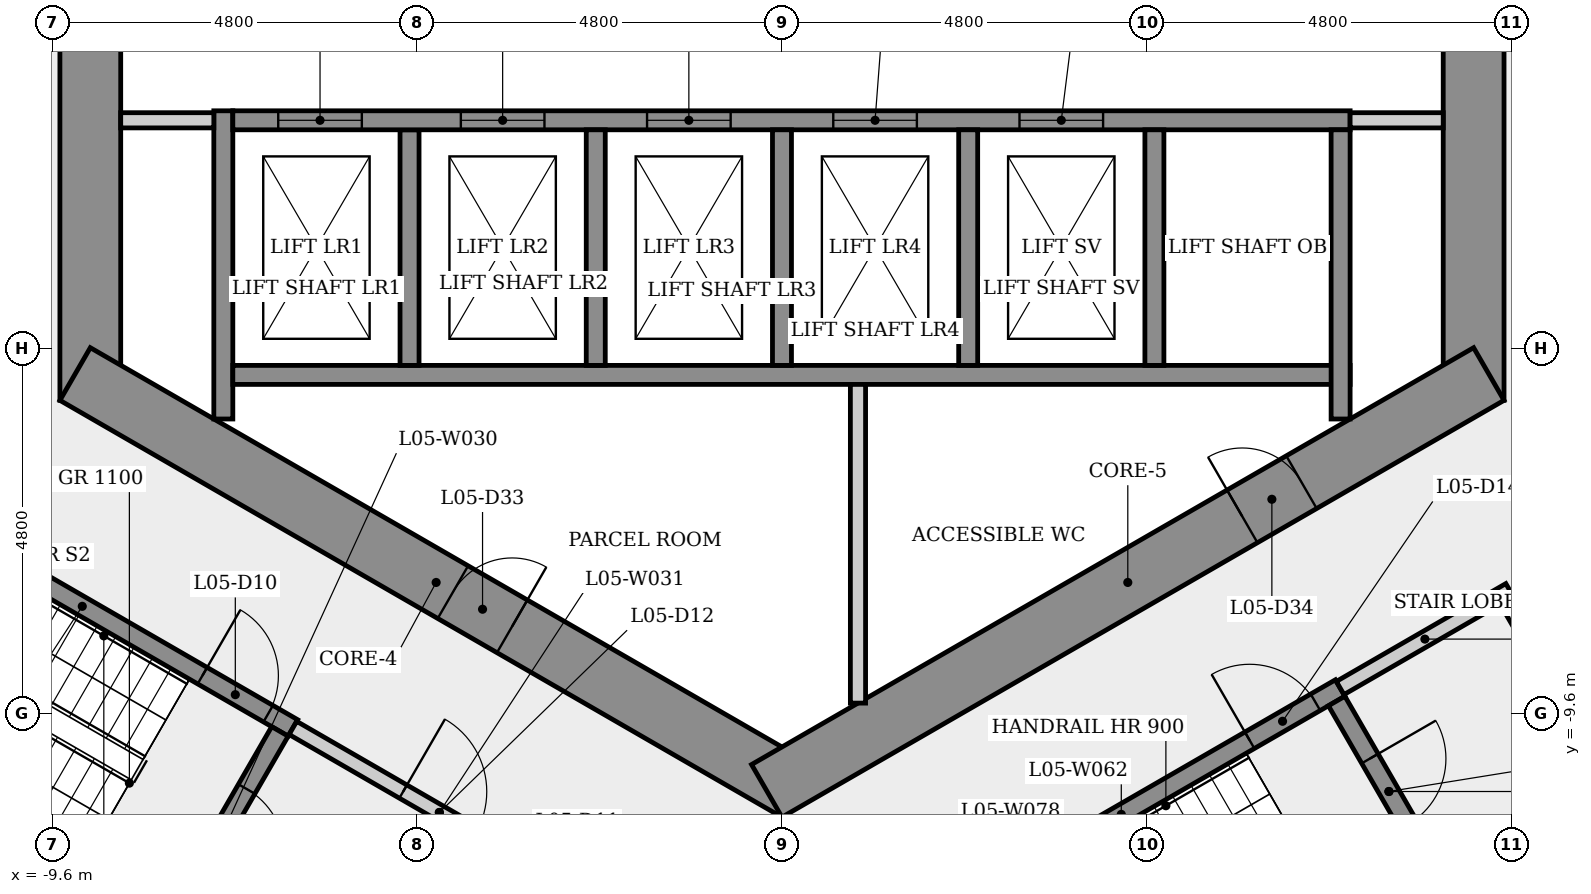
"""IFC4 building model, lengths in metres.
Left out: names, types, materials, properties, quantities, classifications, styles, units other than length and angle.
Written with IfcOpenShell. Run it as: python <this file> out.ifc"""

import sys

from ifc_helpers import new_model, si_unit, direction, frame, frame_2d, origin, place, context, subcontext, project, spatial, rectangle, extrude, element, fill, save


model = new_model("IFC4")
c1 = context("Model", 3, precision=1e-05, world=origin(), true_north=direction((0.0, 1.0)))
c2 = subcontext(c1, "Body", "Model", "MODEL_VIEW")
j1 = project(units=[si_unit("LENGTHUNIT", "METRE"), si_unit("PLANEANGLEUNIT", "RADIAN")], contexts=[c1])
p1 = place(None, origin())
s1 = spatial("IfcSite", under=j1, at=p1, CompositionType="ELEMENT")
p2 = place(p1, origin())
s2 = spatial("IfcBuilding", under=s1, at=p2, CompositionType="ELEMENT")
p3 = place(p2, frame((0.0, 0.0, 25.5)))
s3 = spatial("IfcBuildingStorey", under=s2, at=p3, CompositionType="ELEMENT", Elevation=25.5)
p4 = place(p3, frame((9.1, -5.485, 0.0), z_axis=(0.0, 0.0, 1.0), x_axis=(0.0, 1.0, 0.0)))
e1 = element("IfcWall", 1, at=p4, inside=s3, PredefinedType="SHEAR", context=c2, shape_type="SweptSolid", body=[
    extrude(rectangle(XDim=10.97, YDim=0.8, at=frame_2d((5.485, 0.0))), origin(), (0.0, 0.0, 1.0), 3.4),
])
p5 = place(p4, frame((4.685, 0.0, 0.0)))
e2 = element("IfcOpeningElement", 2, at=p5, cuts=e1, PredefinedType="OPENING", context=c2, shape_type="SweptSolid", body=[
    extrude(rectangle(XDim=1.6, YDim=2.1, at=frame_2d((0.8, 1.05))), frame((0.0, 0.41, 0.0), z_axis=(0.0, -1.0, 0.0), x_axis=(1.0, 0.0, 0.0)), (0.0, 0.0, 1.0), 0.82),
])
p6 = place(p3, frame((-9.1, 5.485, 0.0), z_axis=(0.0, 0.0, 1.0), x_axis=(0.0, -1.0, 0.0)))
e3 = element("IfcWall", 3, at=p6, inside=s3, PredefinedType="SHEAR", context=c2, shape_type="SweptSolid", body=[
    extrude(rectangle(XDim=10.97, YDim=0.8, at=frame_2d((5.485, 0.0))), origin(), (0.0, 0.0, 1.0), 3.4),
])
p7 = place(p6, frame((4.685, 0.0, 0.0)))
e4 = element("IfcOpeningElement", 4, at=p7, cuts=e3, PredefinedType="OPENING", context=c2, shape_type="SweptSolid", body=[
    extrude(rectangle(XDim=1.6, YDim=2.1, at=frame_2d((0.8, 1.05))), frame((0.0, 0.41, 0.0), z_axis=(0.0, -1.0, 0.0), x_axis=(1.0, 0.0, 0.0)), (0.0, 0.0, 1.0), 0.82),
])
p8 = place(p3, frame((-9.3, -5.138, 0.0), z_axis=(0.0, 0.0, 1.0), x_axis=(0.866023993627, -0.500002442456, 0.0)))
e5 = element("IfcWall", 5, at=p8, inside=s3, PredefinedType="SHEAR", context=c2, shape_type="SweptSolid", body=[
    extrude(rectangle(XDim=10.97, YDim=0.8, at=frame_2d((5.485, 0.0))), origin(), (0.0, 0.0, 1.0), 3.4),
])
p9 = place(p8, frame((5.74, 0.0, 0.0)))
e6 = element("IfcOpeningElement", 6, at=p9, cuts=e5, PredefinedType="OPENING", context=c2, shape_type="SweptSolid", body=[
    extrude(rectangle(XDim=0.9, YDim=2.1, at=frame_2d((0.45, 1.05))), frame((0.0, 0.41, 0.0), z_axis=(0.0, -1.0, 0.0), x_axis=(1.0, 0.0, 0.0)), (0.0, 0.0, 1.0), 0.82),
])
p10 = place(p3, frame((-0.2, -10.623, 0.0), z_axis=(0.0, 0.0, 1.0), x_axis=(0.866023993627, 0.500002442456, 0.0)))
e7 = element("IfcWall", 7, at=p10, inside=s3, PredefinedType="SHEAR", context=c2, shape_type="SweptSolid", body=[
    extrude(rectangle(XDim=10.97, YDim=0.8, at=frame_2d((5.485, 0.0))), origin(), (0.0, 0.0, 1.0), 3.4),
])
p11 = place(p10, frame((7.224, 0.0, 0.0)))
e8 = element("IfcOpeningElement", 8, at=p11, cuts=e7, PredefinedType="OPENING", context=c2, shape_type="SweptSolid", body=[
    extrude(rectangle(XDim=0.9, YDim=2.1, at=frame_2d((0.45, 1.05))), frame((0.0, 0.41, 0.0), z_axis=(0.0, -1.0, 0.0), x_axis=(1.0, 0.0, 0.0)), (0.0, 0.0, 1.0), 0.82),
])
p12 = place(p3, frame((-11.977, -6.595, 0.0), z_axis=(0.0, 0.0, 1.0), x_axis=(0.866025499775, -0.499999833739, 0.0)))
e9 = element("IfcWall", 9, at=p12, inside=s3, PredefinedType="SHEAR", context=c2, shape_type="SweptSolid", body=[
    extrude(rectangle(XDim=6.4, YDim=0.25, at=frame_2d((3.2, 0.0))), origin(), (0.0, 0.0, 1.0), 3.05),
])
p13 = place(p12, frame((5.025, 0.0, 0.0)))
e10 = element("IfcOpeningElement", 10, at=p13, cuts=e9, PredefinedType="OPENING", context=c2, shape_type="SweptSolid", body=[
    extrude(rectangle(XDim=1.0, YDim=2.1, at=frame_2d((0.5, 1.05))), frame((0.0, 0.135, 0.0), z_axis=(0.0, -1.0, 0.0), x_axis=(1.0, 0.0, 0.0)), (0.0, 0.0, 1.0), 0.27),
])
p14 = place(p3, frame((-7.935, -12.393, 0.0), z_axis=(0.0, 0.0, 1.0), x_axis=(-0.866025499775, 0.499999833739, 0.0)))
e11 = element("IfcWall", 11, at=p14, inside=s3, PredefinedType="SHEAR", context=c2, shape_type="SweptSolid", body=[
    extrude(rectangle(XDim=6.4, YDim=0.25, at=frame_2d((3.2, 0.0))), origin(), (0.0, 0.0, 1.0), 3.05),
])
p15 = place(p3, frame((-7.35, -5.73, 0.0), z_axis=(0.0, 0.0, 1.0), x_axis=(0.0, 1.0, 0.0)))
e12 = element("IfcWall", 12, at=p15, inside=s3, PredefinedType="SHEAR", context=c2, shape_type="SweptSolid", body=[
    extrude(rectangle(XDim=4.055, YDim=0.25, at=frame_2d((2.028, 0.0))), origin(), (0.0, 0.0, 1.0), 3.05),
])
p16 = place(p3, frame((-7.475, -1.8, 0.0), z_axis=(0.0, 0.0, 1.0), x_axis=(-1.0, 0.0, 0.0)))
e13 = element("IfcWall", 13, at=p16, inside=s3, PredefinedType="PARTITIONING", context=c2, shape_type="SweptSolid", body=[
    extrude(rectangle(XDim=1.225, YDim=0.2, at=frame_2d((0.613, 0.0))), origin(), (0.0, 0.0, 1.0), 3.05),
])
p17 = place(p3, frame((-6.605, -9.841, 0.0), z_axis=(0.0, 0.0, 1.0), x_axis=(-0.499996545922, -0.866027397988, 0.0)))
e14 = element("IfcWall", 14, at=p17, inside=s3, PredefinedType="SHEAR", context=c2, shape_type="SweptSolid", body=[
    extrude(rectangle(XDim=2.75, YDim=0.25, at=frame_2d((1.375, 0.0))), origin(), (0.0, 0.0, 1.0), 3.05),
])
p18 = place(p17, frame((0.875, 0.0, 0.0)))
e15 = element("IfcOpeningElement", 15, at=p18, cuts=e14, PredefinedType="OPENING", context=c2, shape_type="SweptSolid", body=[
    extrude(rectangle(XDim=1.0, YDim=2.1, at=frame_2d((0.5, 1.05))), frame((0.0, 0.135, 0.0), z_axis=(0.0, -1.0, 0.0), x_axis=(1.0, 0.0, 0.0)), (0.0, 0.0, 1.0), 0.27),
])
p19 = place(p3, frame((-6.435, -9.795, 0.0), z_axis=(0.0, 0.0, 1.0), x_axis=(0.866012907634, -0.500021643343, 0.0)))
e16 = element("IfcWall", 16, at=p19, inside=s3, PredefinedType="PARTITIONING", context=c2, shape_type="SweptSolid", body=[
    extrude(rectangle(XDim=4.45, YDim=0.2, at=frame_2d((2.225, 0.0))), origin(), (0.0, 0.0, 1.0), 3.05),
])
p20 = place(p19, frame((1.675, 0.0, 0.0)))
e17 = element("IfcOpeningElement", 17, at=p20, cuts=e16, PredefinedType="OPENING", context=c2, shape_type="SweptSolid", body=[
    extrude(rectangle(XDim=1.1, YDim=2.1, at=frame_2d((0.55, 1.05))), frame((0.0, 0.11, 0.0), z_axis=(0.0, -1.0, 0.0), x_axis=(1.0, 0.0, 0.0)), (0.0, 0.0, 1.0), 0.22),
])
p21 = place(p3, frame((-7.225, -5.15, 0.0), z_axis=(0.0, 0.0, 1.0), x_axis=(1.0, 0.0, 0.0)))
e18 = element("IfcWall", 18, at=p21, inside=s3, PredefinedType="SHEAR", context=c2, shape_type="SweptSolid", body=[
    extrude(rectangle(XDim=14.7, YDim=0.25, at=frame_2d((7.35, 0.0))), origin(), (0.0, 0.0, 1.0), 3.05),
])
p22 = place(p3, frame((-4.9, -1.925, 0.0), z_axis=(0.0, 0.0, 1.0), x_axis=(0.0, -1.0, 0.0)))
e19 = element("IfcWall", 19, at=p22, inside=s3, PredefinedType="SHEAR", context=c2, shape_type="SweptSolid", body=[
    extrude(rectangle(XDim=3.1, YDim=0.25, at=frame_2d((1.55, 0.0))), origin(), (0.0, 0.0, 1.0), 3.4),
])
p23 = place(p3, frame((-7.225, -1.8, 0.0), z_axis=(0.0, 0.0, 1.0), x_axis=(1.0, 0.0, 0.0)))
e20 = element("IfcWall", 20, at=p23, inside=s3, PredefinedType="SHEAR", context=c2, shape_type="SweptSolid", body=[
    extrude(rectangle(XDim=14.7, YDim=0.25, at=frame_2d((7.35, 0.0))), origin(), (0.0, 0.0, 1.0), 3.05),
])
p24 = place(p23, frame((0.597, 0.0, 0.0)))
e21 = element("IfcOpeningElement", 21, at=p24, cuts=e20, PredefinedType="OPENING", context=c2, shape_type="SweptSolid", body=[
    extrude(rectangle(XDim=1.1, YDim=2.1, at=frame_2d((0.55, 1.05))), frame((0.0, 0.135, 0.0), z_axis=(0.0, -1.0, 0.0), x_axis=(1.0, 0.0, 0.0)), (0.0, 0.0, 1.0), 0.27),
])
p25 = place(p23, frame((3.0, 0.0, 0.0)))
e22 = element("IfcOpeningElement", 22, at=p25, cuts=e20, PredefinedType="OPENING", context=c2, shape_type="SweptSolid", body=[
    extrude(rectangle(XDim=1.1, YDim=2.1, at=frame_2d((0.55, 1.05))), frame((0.0, 0.135, 0.0), z_axis=(0.0, -1.0, 0.0), x_axis=(1.0, 0.0, 0.0)), (0.0, 0.0, 1.0), 0.27),
])
p26 = place(p23, frame((5.45, 0.0, 0.0)))
e23 = element("IfcOpeningElement", 23, at=p26, cuts=e20, PredefinedType="OPENING", context=c2, shape_type="SweptSolid", body=[
    extrude(rectangle(XDim=1.1, YDim=2.1, at=frame_2d((0.55, 1.05))), frame((0.0, 0.135, 0.0), z_axis=(0.0, -1.0, 0.0), x_axis=(1.0, 0.0, 0.0)), (0.0, 0.0, 1.0), 0.27),
])
p27 = place(p23, frame((7.9, 0.0, 0.0)))
e24 = element("IfcOpeningElement", 24, at=p27, cuts=e20, PredefinedType="OPENING", context=c2, shape_type="SweptSolid", body=[
    extrude(rectangle(XDim=1.1, YDim=2.1, at=frame_2d((0.55, 1.05))), frame((0.0, 0.135, 0.0), z_axis=(0.0, -1.0, 0.0), x_axis=(1.0, 0.0, 0.0)), (0.0, 0.0, 1.0), 0.27),
])
p28 = place(p23, frame((10.35, 0.0, 0.0)))
e25 = element("IfcOpeningElement", 25, at=p28, cuts=e20, PredefinedType="OPENING", context=c2, shape_type="SweptSolid", body=[
    extrude(rectangle(XDim=1.1, YDim=2.1, at=frame_2d((0.55, 1.05))), frame((0.0, 0.135, 0.0), z_axis=(0.0, -1.0, 0.0), x_axis=(1.0, 0.0, 0.0)), (0.0, 0.0, 1.0), 0.27),
])
for number, where, z_axis, x_axis in (
    (26, (-2.45, -1.925, 0.0), (0.0, 0.0, 1.0), (0.0, -1.0, 0.0)),
    (27, (0.0, -1.925, 0.0), (0.0, 0.0, 1.0), (0.0, -1.0, 0.0)),
):
    element("IfcWall", number, at=place(p3, frame(where, z_axis=z_axis, x_axis=x_axis)), inside=s3, PredefinedType="SHEAR", context=c2, shape_type="SweptSolid", body=[
        extrude(rectangle(XDim=3.1, YDim=0.25, at=frame_2d((1.55, 0.0))), origin(), (0.0, 0.0, 1.0), 3.4),
    ])
p29 = place(p3, frame((1.0, -5.275, 0.0), z_axis=(0.0, 0.0, 1.0), x_axis=(0.0, -1.0, 0.0)))
e28 = element("IfcWall", 28, at=p29, inside=s3, PredefinedType="PARTITIONING", context=c2, shape_type="SweptSolid", body=[
    extrude(rectangle(XDim=4.194, YDim=0.2, at=frame_2d((2.097, 0.0))), origin(), (0.0, 0.0, 1.0), 3.05),
])
p30 = place(p3, frame((1.585, -12.595, 0.0), z_axis=(0.0, 0.0, 1.0), x_axis=(0.866036417653, 0.499980922934, 0.0)))
e29 = element("IfcWall", 29, at=p30, inside=s3, PredefinedType="SHEAR", context=c2, shape_type="SweptSolid", body=[
    extrude(rectangle(XDim=6.65, YDim=0.25, at=frame_2d((3.325, 0.0))), origin(), (0.0, 0.0, 1.0), 3.05),
])
p31 = place(p30, frame((5.275, 0.0, 0.0)))
e30 = element("IfcOpeningElement", 30, at=p31, cuts=e29, PredefinedType="OPENING", context=c2, shape_type="SweptSolid", body=[
    extrude(rectangle(XDim=1.0, YDim=2.1, at=frame_2d((0.5, 1.05))), frame((0.0, 0.135, 0.0), z_axis=(0.0, -1.0, 0.0), x_axis=(1.0, 0.0, 0.0)), (0.0, 0.0, 1.0), 0.27),
])
for number, where, z_axis, x_axis in (
    (31, (2.45, -1.925, 0.0), (0.0, 0.0, 1.0), (0.0, -1.0, 0.0)),
    (32, (4.9, -1.925, 0.0), (0.0, 0.0, 1.0), (0.0, -1.0, 0.0)),
):
    element("IfcWall", number, at=place(p3, frame(where, z_axis=z_axis, x_axis=x_axis)), inside=s3, PredefinedType="SHEAR", context=c2, shape_type="SweptSolid", body=[
        extrude(rectangle(XDim=3.1, YDim=0.25, at=frame_2d((1.55, 0.0))), origin(), (0.0, 0.0, 1.0), 3.4),
    ])
p32 = place(p3, frame((7.298, -9.441, 0.0), z_axis=(0.0, 0.0, 1.0), x_axis=(0.500034990121, -0.866005201286, 0.0)))
e33 = element("IfcWall", 33, at=p32, inside=s3, PredefinedType="SHEAR", context=c2, shape_type="SweptSolid", body=[
    extrude(rectangle(XDim=2.75, YDim=0.25, at=frame_2d((1.375, 0.0))), origin(), (0.0, 0.0, 1.0), 3.05),
])
p33 = place(p32, frame((0.875, 0.0, 0.0)))
e34 = element("IfcOpeningElement", 34, at=p33, cuts=e33, PredefinedType="OPENING", context=c2, shape_type="SweptSolid", body=[
    extrude(rectangle(XDim=1.0, YDim=2.1, at=frame_2d((0.5, 1.05))), frame((0.0, 0.135, 0.0), z_axis=(0.0, -1.0, 0.0), x_axis=(1.0, 0.0, 0.0)), (0.0, 0.0, 1.0), 0.27),
])
p34 = place(p3, frame((7.344, -9.27, 0.0), z_axis=(0.0, 0.0, 1.0), x_axis=(0.866005588531, 0.500034319456, 0.0)))
e35 = element("IfcWall", 35, at=p34, inside=s3, PredefinedType="PARTITIONING", context=c2, shape_type="SweptSolid", body=[
    extrude(rectangle(XDim=2.575, YDim=0.2, at=frame_2d((1.288, 0.0))), origin(), (0.0, 0.0, 1.0), 3.05),
])
p35 = place(p3, frame((7.35, -1.925, 0.0), z_axis=(0.0, 0.0, 1.0), x_axis=(0.0, -1.0, 0.0)))
e36 = element("IfcWall", 36, at=p35, inside=s3, PredefinedType="SHEAR", context=c2, shape_type="SweptSolid", body=[
    extrude(rectangle(XDim=3.805, YDim=0.25, at=frame_2d((1.903, 0.0))), origin(), (0.0, 0.0, 1.0), 3.05),
])
p36 = place(p3, frame((8.7, -1.8, 0.0), z_axis=(0.0, 0.0, 1.0), x_axis=(-1.0, 0.0, 0.0)))
e37 = element("IfcWall", 37, at=p36, inside=s3, PredefinedType="PARTITIONING", context=c2, shape_type="SweptSolid", body=[
    extrude(rectangle(XDim=1.225, YDim=0.2, at=frame_2d((0.613, 0.0))), origin(), (0.0, 0.0, 1.0), 3.05),
])
p37 = place(p3, frame((9.537, -8.119, 0.0), z_axis=(0.0, 0.0, 1.0), x_axis=(0.499990139034, -0.866031096941, 0.0)))
e38 = element("IfcWall", 38, at=p37, inside=s3, PredefinedType="PARTITIONING", context=c2, shape_type="SweptSolid", body=[
    extrude(rectangle(XDim=3.0, YDim=0.2, at=frame_2d((1.5, 0.0))), origin(), (0.0, 0.0, 1.0), 3.05),
])
p38 = place(p37, frame((0.935, 0.0, 0.0)))
e39 = element("IfcOpeningElement", 39, at=p38, cuts=e38, PredefinedType="OPENING", context=c2, shape_type="SweptSolid", body=[
    extrude(rectangle(XDim=1.0, YDim=2.1, at=frame_2d((0.5, 1.05))), frame((0.0, 0.11, 0.0), z_axis=(0.0, -1.0, 0.0), x_axis=(1.0, 0.0, 0.0)), (0.0, 0.0, 1.0), 0.22),
])
p39 = place(p3, frame((10.901, -10.681, 0.0), z_axis=(0.0, 0.0, 1.0), x_axis=(-0.866009402589, -0.500027713859, 0.0)))
e40 = element("IfcWall", 40, at=p39, inside=s3, PredefinedType="PARTITIONING", context=c2, shape_type="SweptSolid", body=[
    extrude(rectangle(XDim=2.1, YDim=0.2, at=frame_2d((1.05, 0.0))), origin(), (0.0, 0.0, 1.0), 3.05),
])
p40 = place(p24, origin())
e41 = element("IfcDoor", 41, at=p40, inside=s3, OperationType="SLIDING_TO_LEFT", PredefinedType="DOOR", context=c2, shape_type="SweptSolid", body=[
    extrude(rectangle(XDim=1.1, YDim=2.1, at=frame_2d((0.55, 1.05))), frame((0.0, 0.025, 0.0), z_axis=(0.0, -1.0, 0.0), x_axis=(1.0, 0.0, 0.0)), (0.0, 0.0, 1.0), 0.05),
])
fill(e21, e41)
p41 = place(p25, origin())
e42 = element("IfcDoor", 42, at=p41, inside=s3, OperationType="SLIDING_TO_LEFT", PredefinedType="DOOR", context=c2, shape_type="SweptSolid", body=[
    extrude(rectangle(XDim=1.1, YDim=2.1, at=frame_2d((0.55, 1.05))), frame((0.0, 0.025, 0.0), z_axis=(0.0, -1.0, 0.0), x_axis=(1.0, 0.0, 0.0)), (0.0, 0.0, 1.0), 0.05),
])
fill(e22, e42)
p42 = place(p26, origin())
e43 = element("IfcDoor", 43, at=p42, inside=s3, OperationType="SLIDING_TO_LEFT", PredefinedType="DOOR", context=c2, shape_type="SweptSolid", body=[
    extrude(rectangle(XDim=1.1, YDim=2.1, at=frame_2d((0.55, 1.05))), frame((0.0, 0.025, 0.0), z_axis=(0.0, -1.0, 0.0), x_axis=(1.0, 0.0, 0.0)), (0.0, 0.0, 1.0), 0.05),
])
fill(e23, e43)
p43 = place(p27, origin())
e44 = element("IfcDoor", 44, at=p43, inside=s3, OperationType="SLIDING_TO_LEFT", PredefinedType="DOOR", context=c2, shape_type="SweptSolid", body=[
    extrude(rectangle(XDim=1.1, YDim=2.1, at=frame_2d((0.55, 1.05))), frame((0.0, 0.025, 0.0), z_axis=(0.0, -1.0, 0.0), x_axis=(1.0, 0.0, 0.0)), (0.0, 0.0, 1.0), 0.05),
])
fill(e24, e44)
p44 = place(p28, origin())
e45 = element("IfcDoor", 45, at=p44, inside=s3, OperationType="SLIDING_TO_LEFT", PredefinedType="DOOR", context=c2, shape_type="SweptSolid", body=[
    extrude(rectangle(XDim=1.1, YDim=2.1, at=frame_2d((0.55, 1.05))), frame((0.0, 0.025, 0.0), z_axis=(0.0, -1.0, 0.0), x_axis=(1.0, 0.0, 0.0)), (0.0, 0.0, 1.0), 0.05),
])
fill(e25, e45)
p45 = place(p13, origin())
e46 = element("IfcDoor", 46, at=p45, inside=s3, OperationType="SINGLE_SWING_LEFT", PredefinedType="DOOR", context=c2, shape_type="SweptSolid", body=[
    extrude(rectangle(XDim=1.0, YDim=2.1, at=frame_2d((0.5, 1.05))), frame((0.0, 0.025, 0.0), z_axis=(0.0, -1.0, 0.0), x_axis=(1.0, 0.0, 0.0)), (0.0, 0.0, 1.0), 0.05),
])
fill(e10, e46)
p46 = place(p18, origin())
e47 = element("IfcDoor", 47, at=p46, inside=s3, OperationType="SINGLE_SWING_RIGHT", PredefinedType="DOOR", context=c2, shape_type="SweptSolid", body=[
    extrude(rectangle(XDim=1.0, YDim=2.1, at=frame_2d((0.5, 1.05))), frame((0.0, 0.025, 0.0), z_axis=(0.0, -1.0, 0.0), x_axis=(1.0, 0.0, 0.0)), (0.0, 0.0, 1.0), 0.05),
])
fill(e15, e47)
p47 = place(p20, origin())
e48 = element("IfcDoor", 48, at=p47, inside=s3, OperationType="SINGLE_SWING_LEFT", PredefinedType="DOOR", context=c2, shape_type="SweptSolid", body=[
    extrude(rectangle(XDim=1.1, YDim=2.1, at=frame_2d((0.55, 1.05))), frame((0.0, 0.025, 0.0), z_axis=(0.0, -1.0, 0.0), x_axis=(1.0, 0.0, 0.0)), (0.0, 0.0, 1.0), 0.05),
])
fill(e17, e48)
p48 = place(p31, origin())
e49 = element("IfcDoor", 49, at=p48, inside=s3, OperationType="SINGLE_SWING_LEFT", PredefinedType="DOOR", context=c2, shape_type="SweptSolid", body=[
    extrude(rectangle(XDim=1.0, YDim=2.1, at=frame_2d((0.5, 1.05))), frame((0.0, 0.025, 0.0), z_axis=(0.0, -1.0, 0.0), x_axis=(1.0, 0.0, 0.0)), (0.0, 0.0, 1.0), 0.05),
])
fill(e30, e49)
p49 = place(p33, origin())
e50 = element("IfcDoor", 50, at=p49, inside=s3, OperationType="SINGLE_SWING_LEFT", PredefinedType="DOOR", context=c2, shape_type="SweptSolid", body=[
    extrude(rectangle(XDim=1.0, YDim=2.1, at=frame_2d((0.5, 1.05))), frame((0.0, 0.025, 0.0), z_axis=(0.0, -1.0, 0.0), x_axis=(1.0, 0.0, 0.0)), (0.0, 0.0, 1.0), 0.05),
])
fill(e34, e50)
p50 = place(p9, origin())
e51 = element("IfcDoor", 51, at=p50, inside=s3, OperationType="SINGLE_SWING_RIGHT", PredefinedType="DOOR", context=c2, shape_type="SweptSolid", body=[
    extrude(rectangle(XDim=0.9, YDim=2.1, at=frame_2d((0.45, 1.05))), frame((0.0, 0.025, 0.0), z_axis=(0.0, -1.0, 0.0), x_axis=(1.0, 0.0, 0.0)), (0.0, 0.0, 1.0), 0.05),
])
fill(e6, e51)
p51 = place(p11, origin())
e52 = element("IfcDoor", 52, at=p51, inside=s3, OperationType="SINGLE_SWING_LEFT", PredefinedType="DOOR", context=c2, shape_type="SweptSolid", body=[
    extrude(rectangle(XDim=0.9, YDim=2.1, at=frame_2d((0.45, 1.05))), frame((0.0, 0.025, 0.0), z_axis=(0.0, -1.0, 0.0), x_axis=(1.0, 0.0, 0.0)), (0.0, 0.0, 1.0), 0.05),
])
fill(e8, e52)
save(model, sys.argv[1])
